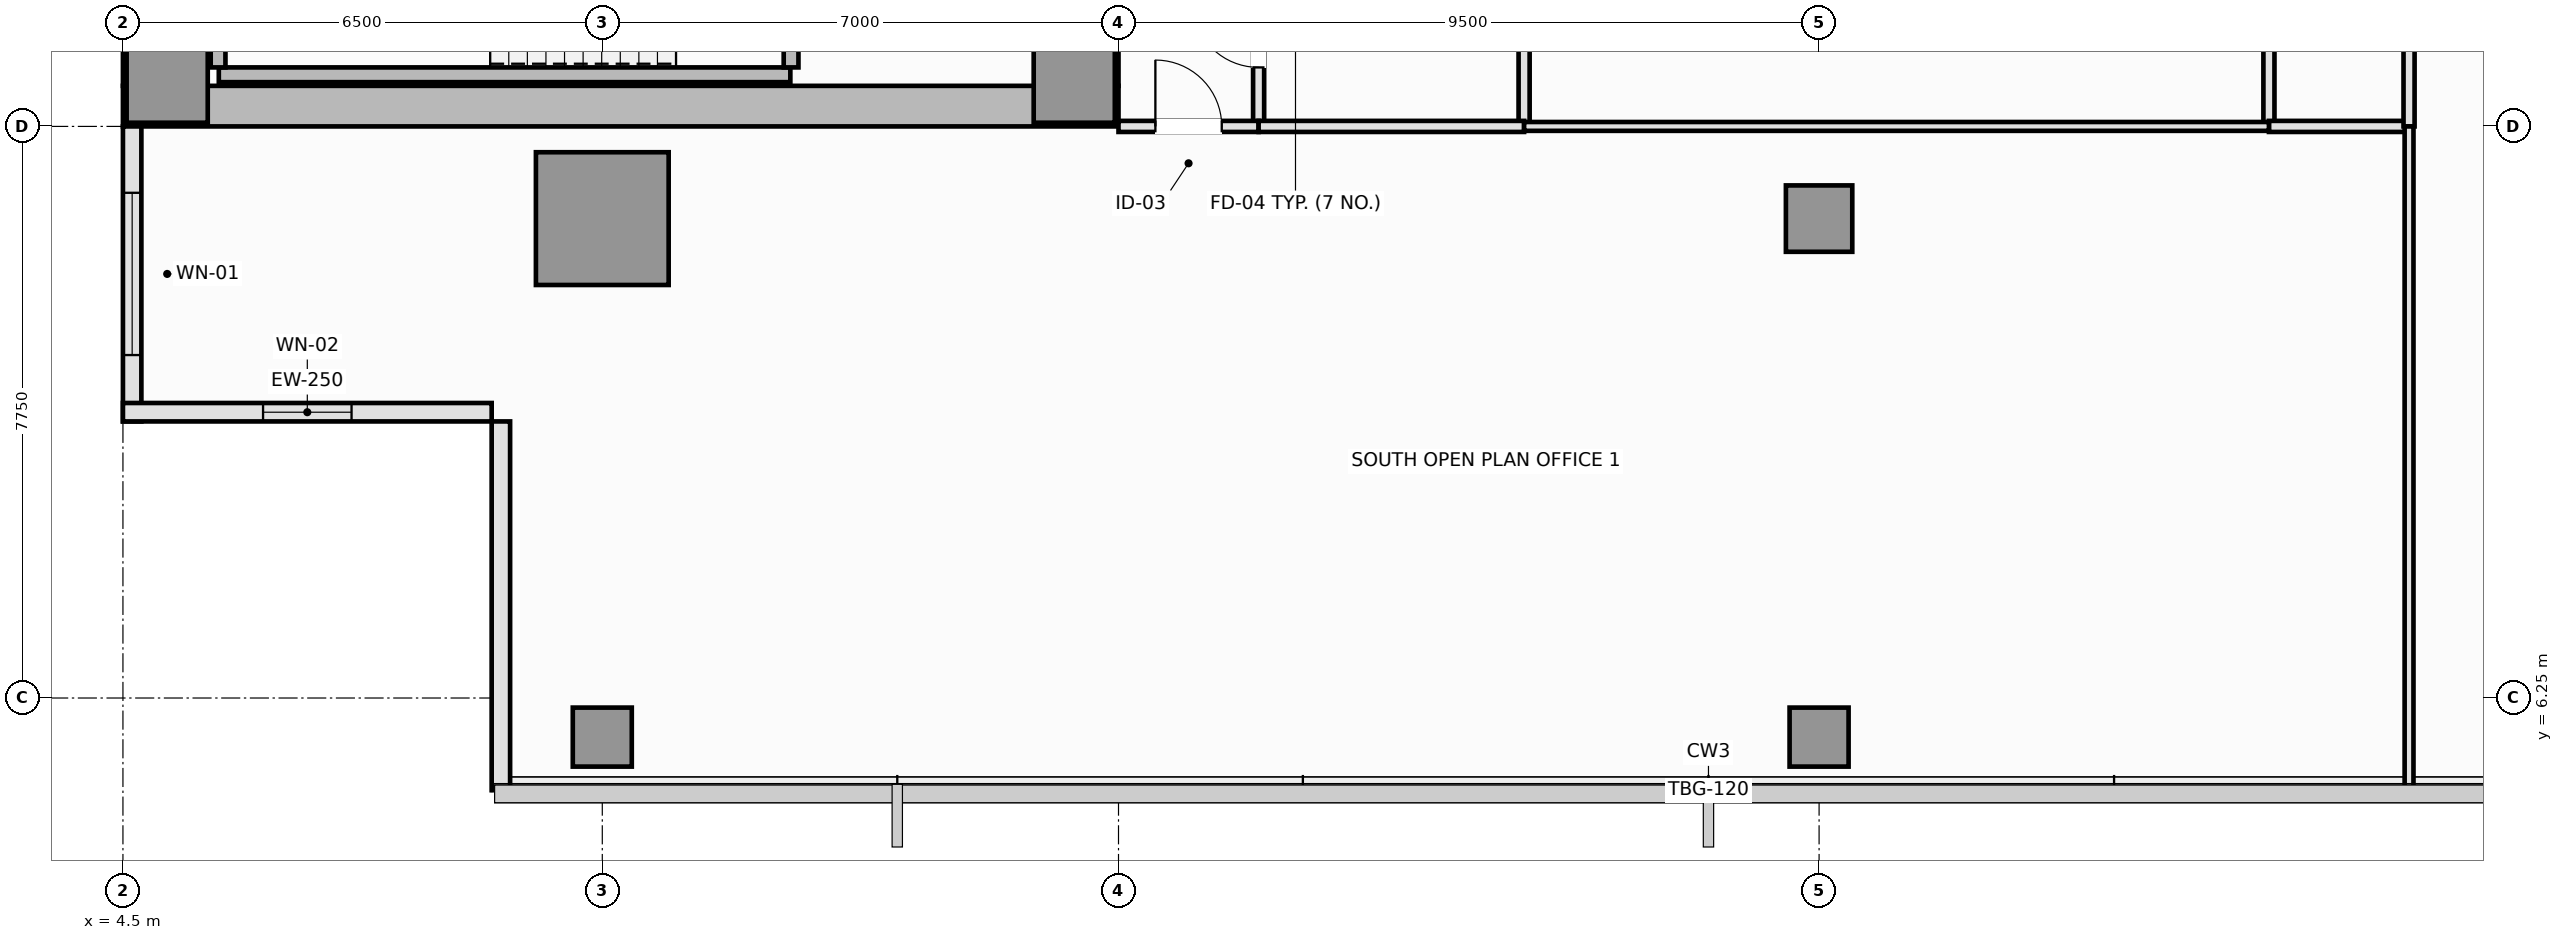
"""IFC4 building model, lengths in metres.
Left out: names, types, materials, properties, quantities, classifications, styles, units other than length and angle.
Written with IfcOpenShell. Run it as: python <this file> out.ifc"""

import sys

from ifc_helpers import new_model, si_unit, direction, frame, frame_2d, origin, origin_2d, place, context, subcontext, project, spatial, rectangle, extrude, element, fill, save


model = new_model("IFC4")
c1 = context("Model", 3, precision=1e-05, world=origin(), true_north=direction((0.0, 1.0)))
c2 = subcontext(c1, "Body", "Model", "MODEL_VIEW")
j1 = project(units=[si_unit("LENGTHUNIT", "METRE"), si_unit("PLANEANGLEUNIT", "RADIAN")], contexts=[c1])
p1 = place(None, origin())
s1 = spatial("IfcSite", under=j1, at=p1, CompositionType="ELEMENT")
p2 = place(p1, origin())
s2 = spatial("IfcBuilding", under=s1, at=p2, CompositionType="ELEMENT")
p3 = place(p2, frame((0.0, 0.0, 234.2)))
s3 = spatial("IfcBuildingStorey", under=s2, at=p3, CompositionType="ELEMENT", Elevation=234.2)
p4 = place(p3, frame((4.5, 14.275, 0.0), z_axis=(0.0, 0.0, 1.0), x_axis=(1.0, 0.0, 0.0)))
e1 = element("IfcWall", 1, at=p4, inside=s3, PredefinedType="SHEAR", context=c2, shape_type="SweptSolid", body=[
    extrude(rectangle(XDim=13.5, YDim=0.55, at=frame_2d((6.75, 0.0))), origin(), (0.0, 0.0, 1.0), 3.55),
])
p5 = place(p3, frame((4.775, 14.55, 0.0), z_axis=(0.0, 0.0, 1.0), x_axis=(0.0, 1.0, 0.0)))
e2 = element("IfcWall", 2, at=p5, inside=s3, PredefinedType="SHEAR", context=c2, shape_type="SweptSolid", body=[
    extrude(rectangle(XDim=21.4, YDim=0.55, at=frame_2d((10.7, 0.0))), origin(), (0.0, 0.0, 1.0), 3.55),
])
p6 = place(p3, frame((17.725, 14.55, 0.0), z_axis=(0.0, 0.0, 1.0), x_axis=(0.0, 1.0, 0.0)))
e3 = element("IfcWall", 3, at=p6, inside=s3, PredefinedType="SHEAR", context=c2, shape_type="SweptSolid", body=[
    extrude(rectangle(XDim=8.9, YDim=0.55, at=frame_2d((4.45, 0.0))), origin(), (0.0, 0.0, 1.0), 3.55),
])
p7 = place(p6, frame((4.35, 0.0, 0.0)))
e4 = element("IfcOpeningElement", 4, at=p7, cuts=e3, PredefinedType="OPENING", context=c2, shape_type="SweptSolid", body=[
    extrude(rectangle(XDim=1.1, YDim=2.15, at=frame_2d((0.55, 1.075))), frame((0.0, 0.285, 0.0), z_axis=(0.0, -1.0, 0.0), x_axis=(1.0, 0.0, 0.0)), (0.0, 0.0, 1.0), 0.57),
])
for number, where, z_axis, x_axis in (
    (5, (5.1, 14.6, 0.0), (0.0, 0.0, 1.0), (1.0, 0.0, 0.0)),
    (6, (17.4, 14.6, 0.0), (0.0, 0.0, 1.0), (1.0, 0.0, 0.0)),
):
    element("IfcColumn", number, at=place(p3, frame(where, z_axis=z_axis, x_axis=x_axis)), inside=s3, PredefinedType="PILASTER", context=c2, shape_type="SweptSolid", body=[
        extrude(rectangle(XDim=1.1, YDim=1.1, at=origin_2d()), origin(), (0.0, 0.0, 1.0), 3.55),
    ])
p8 = place(p3, frame((11.0, 12.75, 0.0), z_axis=(0.0, 0.0, 1.0), x_axis=(1.0, 0.0, 0.0)))
e7 = element("IfcColumn", 7, at=p8, inside=s3, PredefinedType="COLUMN", context=c2, shape_type="SweptSolid", body=[
    extrude(rectangle(XDim=1.8, YDim=1.8, at=origin_2d()), origin(), (0.0, 0.0, 1.0), 3.55),
])
p9 = place(p3, frame((27.5, 12.75, 0.0), z_axis=(0.0, 0.0, 1.0), x_axis=(1.0, 0.0, 0.0)))
e8 = element("IfcColumn", 8, at=p9, inside=s3, PredefinedType="COLUMN", context=c2, shape_type="SweptSolid", body=[
    extrude(rectangle(XDim=0.9, YDim=0.9, at=origin_2d()), origin(), (0.0, 0.0, 1.0), 3.55),
])
for number, where, z_axis, x_axis in (
    (9, (11.0, 5.72, 0.0), (0.0, 0.0, 1.0), (1.0, 0.0, 0.0)),
    (10, (27.5, 5.72, 0.0), (0.0, 0.0, 1.0), (1.0, 0.0, 0.0)),
):
    element("IfcColumn", number, at=place(p3, frame(where, z_axis=z_axis, x_axis=x_axis)), inside=s3, PredefinedType="COLUMN", context=c2, shape_type="SweptSolid", body=[
        extrude(rectangle(XDim=0.8, YDim=0.8, at=origin_2d()), origin(), (0.0, 0.0, 1.0), 3.55),
    ])
p10 = place(p3, frame((4.625, 14.0, 0.0), z_axis=(0.0, 0.0, 1.0), x_axis=(0.0, -1.0, 0.0)))
e11 = element("IfcWall", 11, at=p10, inside=s3, PredefinedType="SOLIDWALL", context=c2, shape_type="SweptSolid", body=[
    extrude(rectangle(XDim=4.0, YDim=0.25, at=frame_2d((2.0, 0.0))), origin(), (0.0, 0.0, 1.0), 3.37),
])
p11 = place(p10, frame((0.9, 0.0, 0.9)))
e12 = element("IfcOpeningElement", 12, at=p11, cuts=e11, PredefinedType="OPENING", context=c2, shape_type="SweptSolid", body=[
    extrude(rectangle(XDim=2.2, YDim=1.8, at=frame_2d((1.1, 0.9))), frame((0.0, 0.135, 0.0), z_axis=(0.0, -1.0, 0.0), x_axis=(1.0, 0.0, 0.0)), (0.0, 0.0, 1.0), 0.27),
])
p12 = place(p3, frame((4.5, 10.125, 0.0), z_axis=(0.0, 0.0, 1.0), x_axis=(1.0, 0.0, 0.0)))
e13 = element("IfcWall", 13, at=p12, inside=s3, PredefinedType="SOLIDWALL", context=c2, shape_type="SweptSolid", body=[
    extrude(rectangle(XDim=5.0, YDim=0.25, at=frame_2d((2.5, 0.0))), origin(), (0.0, 0.0, 1.0), 3.37),
])
p13 = place(p12, frame((1.9, 0.0, 0.9)))
e14 = element("IfcOpeningElement", 14, at=p13, cuts=e13, PredefinedType="OPENING", context=c2, shape_type="SweptSolid", body=[
    extrude(rectangle(XDim=1.2, YDim=1.8, at=frame_2d((0.6, 0.9))), frame((0.0, 0.135, 0.0), z_axis=(0.0, -1.0, 0.0), x_axis=(1.0, 0.0, 0.0)), (0.0, 0.0, 1.0), 0.27),
])
p14 = place(p3, frame((9.625, 10.0, 0.0), z_axis=(0.0, 0.0, 1.0), x_axis=(0.0, -1.0, 0.0)))
e15 = element("IfcWall", 15, at=p14, inside=s3, PredefinedType="SOLIDWALL", context=c2, shape_type="SweptSolid", body=[
    extrude(rectangle(XDim=5.0, YDim=0.25, at=frame_2d((2.5, 0.0))), origin(), (0.0, 0.0, 1.0), 3.37),
])
p15 = place(p3, frame((5.8, 14.7, 0.0), z_axis=(0.0, 0.0, 1.0), x_axis=(1.0, 0.0, 0.0)))
e16 = element("IfcWall", 16, at=p15, inside=s3, PredefinedType="SOLIDWALL", context=c2, shape_type="SweptSolid", body=[
    extrude(rectangle(XDim=7.75, YDim=0.2, at=frame_2d((3.875, 0.0))), origin(), (0.0, 0.0, 1.0), 3.55),
])
p16 = place(p3, frame((5.79, 14.8, 0.0), z_axis=(0.0, 0.0, 1.0), x_axis=(0.0, 1.0, 0.0)))
e17 = element("IfcWall", 17, at=p16, inside=s3, PredefinedType="SOLIDWALL", context=c2, shape_type="SweptSolid", body=[
    extrude(rectangle(XDim=3.05, YDim=0.2, at=frame_2d((1.525, 0.0))), origin(), (0.0, 0.0, 1.0), 3.55),
])
p17 = place(p3, frame((13.56, 14.8, 0.0), z_axis=(0.0, 0.0, 1.0), x_axis=(0.0, 1.0, 0.0)))
e18 = element("IfcWall", 18, at=p17, inside=s3, PredefinedType="SOLIDWALL", context=c2, shape_type="SweptSolid", body=[
    extrude(rectangle(XDim=3.05, YDim=0.2, at=frame_2d((1.525, 0.0))), origin(), (0.0, 0.0, 1.0), 3.55),
])
p18 = place(p17, frame((0.95, 0.0, 0.0)))
e19 = element("IfcOpeningElement", 19, at=p18, cuts=e18, PredefinedType="OPENING", context=c2, shape_type="SweptSolid", body=[
    extrude(rectangle(XDim=1.15, YDim=2.15, at=frame_2d((0.575, 1.075))), frame((0.0, 0.11, 0.0), z_axis=(0.0, -1.0, 0.0), x_axis=(1.0, 0.0, 0.0)), (0.0, 0.0, 1.0), 0.22),
])
p19 = place(p3, frame((19.9, 14.0, 0.0), z_axis=(0.0, 0.0, 1.0), x_axis=(0.0, 1.0, 0.0)))
e20 = element("IfcWall", 20, at=p19, inside=s3, PredefinedType="PLUMBINGWALL", context=c2, shape_type="SweptSolid", body=[
    extrude(rectangle(XDim=2.5, YDim=0.15, at=frame_2d((1.25, 0.0))), origin(), (0.0, 0.0, 1.0), 3.37),
])
p20 = place(p19, frame((0.8, 0.0, 0.0)))
e21 = element("IfcOpeningElement", 21, at=p20, cuts=e20, PredefinedType="OPENING", context=c2, shape_type="SweptSolid", body=[
    extrude(rectangle(XDim=0.9, YDim=2.1, at=frame_2d((0.45, 1.05))), frame((0.0, 0.085, 0.0), z_axis=(0.0, -1.0, 0.0), x_axis=(1.0, 0.0, 0.0)), (0.0, 0.0, 1.0), 0.17),
])
p21 = place(p3, frame((18.0, 14.0, 0.0), z_axis=(0.0, 0.0, 1.0), x_axis=(1.0, 0.0, 0.0)))
e22 = element("IfcWall", 22, at=p21, inside=s3, PredefinedType="PARTITIONING", context=c2, shape_type="SweptSolid", body=[
    extrude(rectangle(XDim=1.9, YDim=0.15, at=frame_2d((0.95, 0.0))), origin(), (0.0, 0.0, 1.0), 3.37),
])
p22 = place(p21, frame((0.5, 0.0, 0.0)))
e23 = element("IfcOpeningElement", 23, at=p22, cuts=e22, PredefinedType="OPENING", context=c2, shape_type="SweptSolid", body=[
    extrude(rectangle(XDim=0.9, YDim=2.1, at=frame_2d((0.45, 1.05))), frame((0.0, 0.085, 0.0), z_axis=(0.0, -1.0, 0.0), x_axis=(1.0, 0.0, 0.0)), (0.0, 0.0, 1.0), 0.17),
])
p23 = place(p3, frame((33.6, 14.0, 0.0), z_axis=(0.0, 0.0, 1.0), x_axis=(0.0, 1.0, 0.0)))
e24 = element("IfcWall", 24, at=p23, inside=s3, PredefinedType="PARTITIONING", context=c2, shape_type="SweptSolid", body=[
    extrude(rectangle(XDim=3.6, YDim=0.15, at=frame_2d((1.8, 0.0))), origin(), (0.0, 0.0, 1.0), 3.37),
])
p24 = place(p23, frame((1.3, 0.0, 0.0)))
e25 = element("IfcOpeningElement", 25, at=p24, cuts=e24, PredefinedType="OPENING", context=c2, shape_type="SweptSolid", body=[
    extrude(rectangle(XDim=1.0, YDim=2.15, at=frame_2d((0.5, 1.075))), frame((0.0, 0.085, 0.0), z_axis=(0.0, -1.0, 0.0), x_axis=(1.0, 0.0, 0.0)), (0.0, 0.0, 1.0), 0.17),
])
p25 = place(p3, frame((33.6, 14.0, 0.0), z_axis=(0.0, 0.0, 1.0), x_axis=(1.0, 0.0, 0.0)))
e26 = element("IfcWall", 26, at=p25, inside=s3, PredefinedType="PARTITIONING", context=c2, shape_type="SweptSolid", body=[
    extrude(rectangle(XDim=1.9, YDim=0.15, at=frame_2d((0.95, 0.0))), origin(), (0.0, 0.0, 1.0), 3.37),
])
p26 = place(p3, frame((35.5, 14.0, 0.0), z_axis=(0.0, 0.0, 1.0), x_axis=(0.0, 1.0, 0.0)))
e27 = element("IfcWall", 27, at=p26, inside=s3, PredefinedType="PARTITIONING", context=c2, shape_type="SweptSolid", body=[
    extrude(rectangle(XDim=22.5, YDim=0.15, at=frame_2d((11.25, 0.0))), origin(), (0.0, 0.0, 1.0), 3.37),
])
p27 = place(p26, frame((10.75, 0.0, 0.0)))
e28 = element("IfcOpeningElement", 28, at=p27, cuts=e27, PredefinedType="OPENING", context=c2, shape_type="SweptSolid", body=[
    extrude(rectangle(XDim=1.0, YDim=2.15, at=frame_2d((0.5, 1.075))), frame((0.0, 0.085, 0.0), z_axis=(0.0, -1.0, 0.0), x_axis=(1.0, 0.0, 0.0)), (0.0, 0.0, 1.0), 0.17),
])
p28 = place(p3, frame((23.5, 14.0, 0.0), z_axis=(0.0, 0.0, 1.0), x_axis=(0.0, 1.0, 0.0)))
e29 = element("IfcWall", 29, at=p28, inside=s3, PredefinedType="PLUMBINGWALL", context=c2, shape_type="SweptSolid", body=[
    extrude(rectangle(XDim=2.5, YDim=0.15, at=frame_2d((1.25, 0.0))), origin(), (0.0, 0.0, 1.0), 3.37),
])
p29 = place(p3, frame((19.9, 14.0, 0.0), z_axis=(0.0, 0.0, 1.0), x_axis=(1.0, 0.0, 0.0)))
e30 = element("IfcWall", 30, at=p29, inside=s3, PredefinedType="PLUMBINGWALL", context=c2, shape_type="SweptSolid", body=[
    extrude(rectangle(XDim=3.6, YDim=0.15, at=frame_2d((1.8, 0.0))), origin(), (0.0, 0.0, 1.0), 3.37),
])
p30 = place(p3, frame((23.5, 14.0, 0.0), z_axis=(0.0, 0.0, 1.0), x_axis=(1.0, 0.0, 0.0)))
e31 = element("IfcWall", 31, at=p30, inside=s3, PredefinedType="PARTITIONING", context=c2, shape_type="SweptSolid", body=[
    extrude(rectangle(XDim=10.1, YDim=0.12, at=frame_2d((5.05, 0.0))), origin(), (0.0, 0.0, 1.0), 3.37),
])
p31 = place(p3, frame((35.5, 5.01, 0.0), z_axis=(0.0, 0.0, 1.0), x_axis=(0.0, 1.0, 0.0)))
e32 = element("IfcWall", 32, at=p31, inside=s3, PredefinedType="PARTITIONING", context=c2, shape_type="SweptSolid", body=[
    extrude(rectangle(XDim=8.99, YDim=0.12, at=frame_2d((4.495, 0.0))), origin(), (0.0, 0.0, 1.0), 3.37),
])
p32 = place(p11, origin())
e33 = element("IfcWindow", 33, at=p32, inside=s3, PartitioningType="SINGLE_PANEL", PredefinedType="WINDOW", context=c2, shape_type="SweptSolid", body=[
    extrude(rectangle(XDim=2.2, YDim=1.8, at=frame_2d((1.1, 0.9))), frame((0.0, 0.03, 0.0), z_axis=(0.0, -1.0, 0.0), x_axis=(1.0, 0.0, 0.0)), (0.0, 0.0, 1.0), 0.06),
])
fill(e12, e33)
p33 = place(p13, origin())
e34 = element("IfcWindow", 34, at=p33, inside=s3, PartitioningType="SINGLE_PANEL", PredefinedType="WINDOW", context=c2, shape_type="SweptSolid", body=[
    extrude(rectangle(XDim=1.2, YDim=1.8, at=frame_2d((0.6, 0.9))), frame((0.0, 0.03, 0.0), z_axis=(0.0, -1.0, 0.0), x_axis=(1.0, 0.0, 0.0)), (0.0, 0.0, 1.0), 0.06),
])
fill(e14, e34)
p34 = place(p20, origin())
e35 = element("IfcDoor", 35, at=p34, inside=s3, OperationType="SINGLE_SWING_RIGHT", PredefinedType="DOOR", context=c2, shape_type="SweptSolid", body=[
    extrude(rectangle(XDim=0.9, YDim=2.1, at=frame_2d((0.45, 1.05))), frame((0.0, 0.025, 0.0), z_axis=(0.0, -1.0, 0.0), x_axis=(1.0, 0.0, 0.0)), (0.0, 0.0, 1.0), 0.05),
])
fill(e21, e35)
p35 = place(p22, origin())
e36 = element("IfcDoor", 36, at=p35, inside=s3, OperationType="SINGLE_SWING_LEFT", PredefinedType="DOOR", context=c2, shape_type="SweptSolid", body=[
    extrude(rectangle(XDim=0.9, YDim=2.1, at=frame_2d((0.45, 1.05))), frame((0.0, 0.025, 0.0), z_axis=(0.0, -1.0, 0.0), x_axis=(1.0, 0.0, 0.0)), (0.0, 0.0, 1.0), 0.05),
])
fill(e23, e36)
save(model, sys.argv[1])
